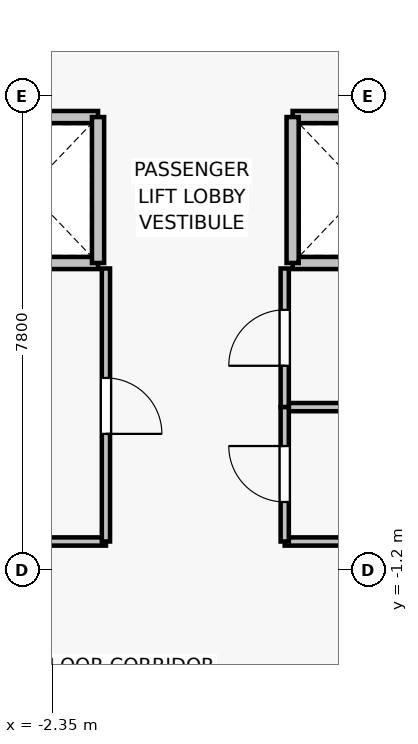
"""IFC4 building model, lengths in metres.
Left out: names, types, materials, properties, quantities, classifications, styles, units other than length and angle.
Written with IfcOpenShell. Run it as: python <this file> out.ifc"""

import sys

from ifc_helpers import new_model, si_unit, direction, frame, frame_2d, origin, place, context, subcontext, project, spatial, rectangle, extrude, source, transform, mapped, element, fill, save


model = new_model("IFC4")
c1 = context("Model", 3, precision=1e-05, world=origin(), true_north=direction((0.0, 1.0)))
c2 = subcontext(c1, "Body", "Model", "MODEL_VIEW")
j1 = project(units=[si_unit("LENGTHUNIT", "METRE"), si_unit("PLANEANGLEUNIT", "RADIAN")], contexts=[c1])
p1 = place(None, origin())
s1 = spatial("IfcSite", under=j1, at=p1, CompositionType="ELEMENT")
p2 = place(p1, origin())
s2 = spatial("IfcBuilding", under=s1, at=p2, CompositionType="ELEMENT")
p3 = place(p2, frame((0.0, 0.0, 76.9)))
s3 = spatial("IfcBuildingStorey", under=s2, at=p3, CompositionType="ELEMENT", Elevation=76.9)
for number, where, z_axis, x_axis in (
    (1, (-1.6, 3.85, 0.0), (0.0, 0.0, 1.0), (-1.0, 0.0, 0.0)),
    (2, (-3.9, 6.25, 0.0), (0.0, 0.0, 1.0), (1.0, 0.0, 0.0)),
):
    element("IfcWall", number, at=place(p3, frame(where, z_axis=z_axis, x_axis=x_axis)), inside=s3, PredefinedType="SOLIDWALL", context=c2, shape_type="SweptSolid", body=[
        extrude(rectangle(XDim=2.3, YDim=0.2, at=frame_2d((1.15, 0.0))), origin(), (0.0, 0.0, 1.0), 3.05),
    ])
p4 = place(p3, frame((-1.6, 6.25, 0.0), z_axis=(0.0, 0.0, 1.0), x_axis=(0.0, -1.0, 0.0)))
e3 = element("IfcWall", 3, at=p4, inside=s3, PredefinedType="SOLIDWALL", context=c2, shape_type="SweptSolid", body=[
    extrude(rectangle(XDim=2.4, YDim=0.2, at=frame_2d((1.2, 0.0))), origin(), (0.0, 0.0, 1.0), 3.05),
])
for number, where, z_axis, x_axis in (
    (4, (3.9, 3.85, 0.0), (0.0, 0.0, 1.0), (-1.0, 0.0, 0.0)),
    (5, (1.6, 6.25, 0.0), (0.0, 0.0, 1.0), (1.0, 0.0, 0.0)),
):
    element("IfcWall", number, at=place(p3, frame(where, z_axis=z_axis, x_axis=x_axis)), inside=s3, PredefinedType="SOLIDWALL", context=c2, shape_type="SweptSolid", body=[
        extrude(rectangle(XDim=2.3, YDim=0.2, at=frame_2d((1.15, 0.0))), origin(), (0.0, 0.0, 1.0), 3.05),
    ])
p5 = place(p3, frame((1.6, 3.85, 0.0), z_axis=(0.0, 0.0, 1.0), x_axis=(0.0, 1.0, 0.0)))
e6 = element("IfcWall", 6, at=p5, inside=s3, PredefinedType="SOLIDWALL", context=c2, shape_type="SweptSolid", body=[
    extrude(rectangle(XDim=2.4, YDim=0.2, at=frame_2d((1.2, 0.0))), origin(), (0.0, 0.0, 1.0), 3.05),
])
p6 = place(p3, frame((-1.47, -0.73, 0.0), z_axis=(0.0, 0.0, 1.0), x_axis=(-1.0, 0.0, 0.0)))
e7 = element("IfcWall", 7, at=p6, inside=s3, PredefinedType="PARTITIONING", context=c2, shape_type="SweptSolid", body=[
    extrude(rectangle(XDim=5.11, YDim=0.135, at=frame_2d((2.555, 0.0))), origin(), (0.0, 0.0, 1.0), 3.05),
])
p7 = place(p3, frame((-1.47, 3.76, 0.0), z_axis=(0.0, 0.0, 1.0), x_axis=(0.0, -1.0, 0.0)))
e8 = element("IfcWall", 8, at=p7, inside=s3, PredefinedType="PARTITIONING", context=c2, shape_type="SweptSolid", body=[
    extrude(rectangle(XDim=4.49, YDim=0.135, at=frame_2d((2.245, 0.0))), origin(), (0.0, 0.0, 1.0), 3.05),
])
p8 = place(p7, frame((1.8, 0.0, 0.0)))
e9 = element("IfcOpeningElement", 9, at=p8, cuts=e8, PredefinedType="OPENING", context=c2, shape_type="SweptSolid", body=[
    extrude(rectangle(XDim=0.92, YDim=2.1, at=frame_2d((0.46, 1.05))), frame((0.0, 0.077, 0.0), z_axis=(0.0, -1.0, 0.0), x_axis=(1.0, 0.0, 0.0)), (0.0, 0.0, 1.0), 0.155),
])
p9 = place(p3, frame((6.58, 1.48, 0.0), z_axis=(0.0, 0.0, 1.0), x_axis=(-1.0, 0.0, 0.0)))
e10 = element("IfcWall", 10, at=p9, inside=s3, PredefinedType="PARTITIONING", context=c2, shape_type="SweptSolid", body=[
    extrude(rectangle(XDim=5.11, YDim=0.135, at=frame_2d((2.555, 0.0))), origin(), (0.0, 0.0, 1.0), 3.05),
])
p10 = place(p3, frame((1.47, 1.48, 0.0), z_axis=(0.0, 0.0, 1.0), x_axis=(0.0, 1.0, 0.0)))
e11 = element("IfcWall", 11, at=p10, inside=s3, PredefinedType="PARTITIONING", context=c2, shape_type="SweptSolid", body=[
    extrude(rectangle(XDim=2.28, YDim=0.135, at=frame_2d((1.14, 0.0))), origin(), (0.0, 0.0, 1.0), 3.05),
])
p11 = place(p10, frame((0.68, 0.0, 0.0)))
e12 = element("IfcOpeningElement", 12, at=p11, cuts=e11, PredefinedType="OPENING", context=c2, shape_type="SweptSolid", body=[
    extrude(rectangle(XDim=0.92, YDim=2.1, at=frame_2d((0.46, 1.05))), frame((0.0, 0.077, 0.0), z_axis=(0.0, -1.0, 0.0), x_axis=(1.0, 0.0, 0.0)), (0.0, 0.0, 1.0), 0.155),
])
p12 = place(p3, frame((4.18, -0.73, 0.0), z_axis=(0.0, 0.0, 1.0), x_axis=(-1.0, 0.0, 0.0)))
e13 = element("IfcWall", 13, at=p12, inside=s3, PredefinedType="PARTITIONING", context=c2, shape_type="SweptSolid", body=[
    extrude(rectangle(XDim=2.71, YDim=0.135, at=frame_2d((1.355, 0.0))), origin(), (0.0, 0.0, 1.0), 3.05),
])
p13 = place(p3, frame((1.47, -0.73, 0.0), z_axis=(0.0, 0.0, 1.0), x_axis=(0.0, 1.0, 0.0)))
e14 = element("IfcWall", 14, at=p13, inside=s3, PredefinedType="PARTITIONING", context=c2, shape_type="SweptSolid", body=[
    extrude(rectangle(XDim=2.21, YDim=0.135, at=frame_2d((1.105, 0.0))), origin(), (0.0, 0.0, 1.0), 3.05),
])
p14 = place(p13, frame((0.65, 0.0, 0.0)))
e15 = element("IfcOpeningElement", 15, at=p14, cuts=e14, PredefinedType="OPENING", context=c2, shape_type="SweptSolid", body=[
    extrude(rectangle(XDim=0.92, YDim=2.1, at=frame_2d((0.46, 1.05))), frame((0.0, 0.077, 0.0), z_axis=(0.0, -1.0, 0.0), x_axis=(1.0, 0.0, 0.0)), (0.0, 0.0, 1.0), 0.155),
])
m1 = source(origin(), c2, "Body", "SweptSolid", [
    extrude(rectangle(XDim=0.92, YDim=2.1, at=frame_2d((0.46, 1.05))), frame((0.0, 0.025, 0.0), z_axis=(0.0, -1.0, 0.0), x_axis=(1.0, 0.0, 0.0)), (0.0, 0.0, 1.0), 0.05),
])
p15 = place(p8, origin())
e16 = element("IfcDoor", 16, at=p15, inside=s3, OperationType="SINGLE_SWING_RIGHT", PredefinedType="DOOR", context=c2, shape_type="MappedRepresentation", body=[
    mapped(m1, transform((0.0, 0.0, 0.0), x_axis=(1.0, 0.0, 0.0), y_axis=(0.0, 1.0, 0.0), z_axis=(0.0, 0.0, 1.0), scale=1.0)),
])
fill(e9, e16)
p16 = place(p11, origin())
e17 = element("IfcDoor", 17, at=p16, inside=s3, OperationType="SINGLE_SWING_LEFT", PredefinedType="DOOR", context=c2, shape_type="MappedRepresentation", body=[
    mapped(m1, transform((0.0, 0.0, 0.0), x_axis=(1.0, 0.0, 0.0), y_axis=(0.0, 1.0, 0.0), z_axis=(0.0, 0.0, 1.0), scale=1.0)),
])
fill(e12, e17)
p17 = place(p14, origin())
e18 = element("IfcDoor", 18, at=p17, inside=s3, OperationType="SINGLE_SWING_RIGHT", PredefinedType="DOOR", context=c2, shape_type="MappedRepresentation", body=[
    mapped(m1, transform((0.0, 0.0, 0.0), x_axis=(1.0, 0.0, 0.0), y_axis=(0.0, 1.0, 0.0), z_axis=(0.0, 0.0, 1.0), scale=1.0)),
])
fill(e15, e18)
save(model, sys.argv[1])
